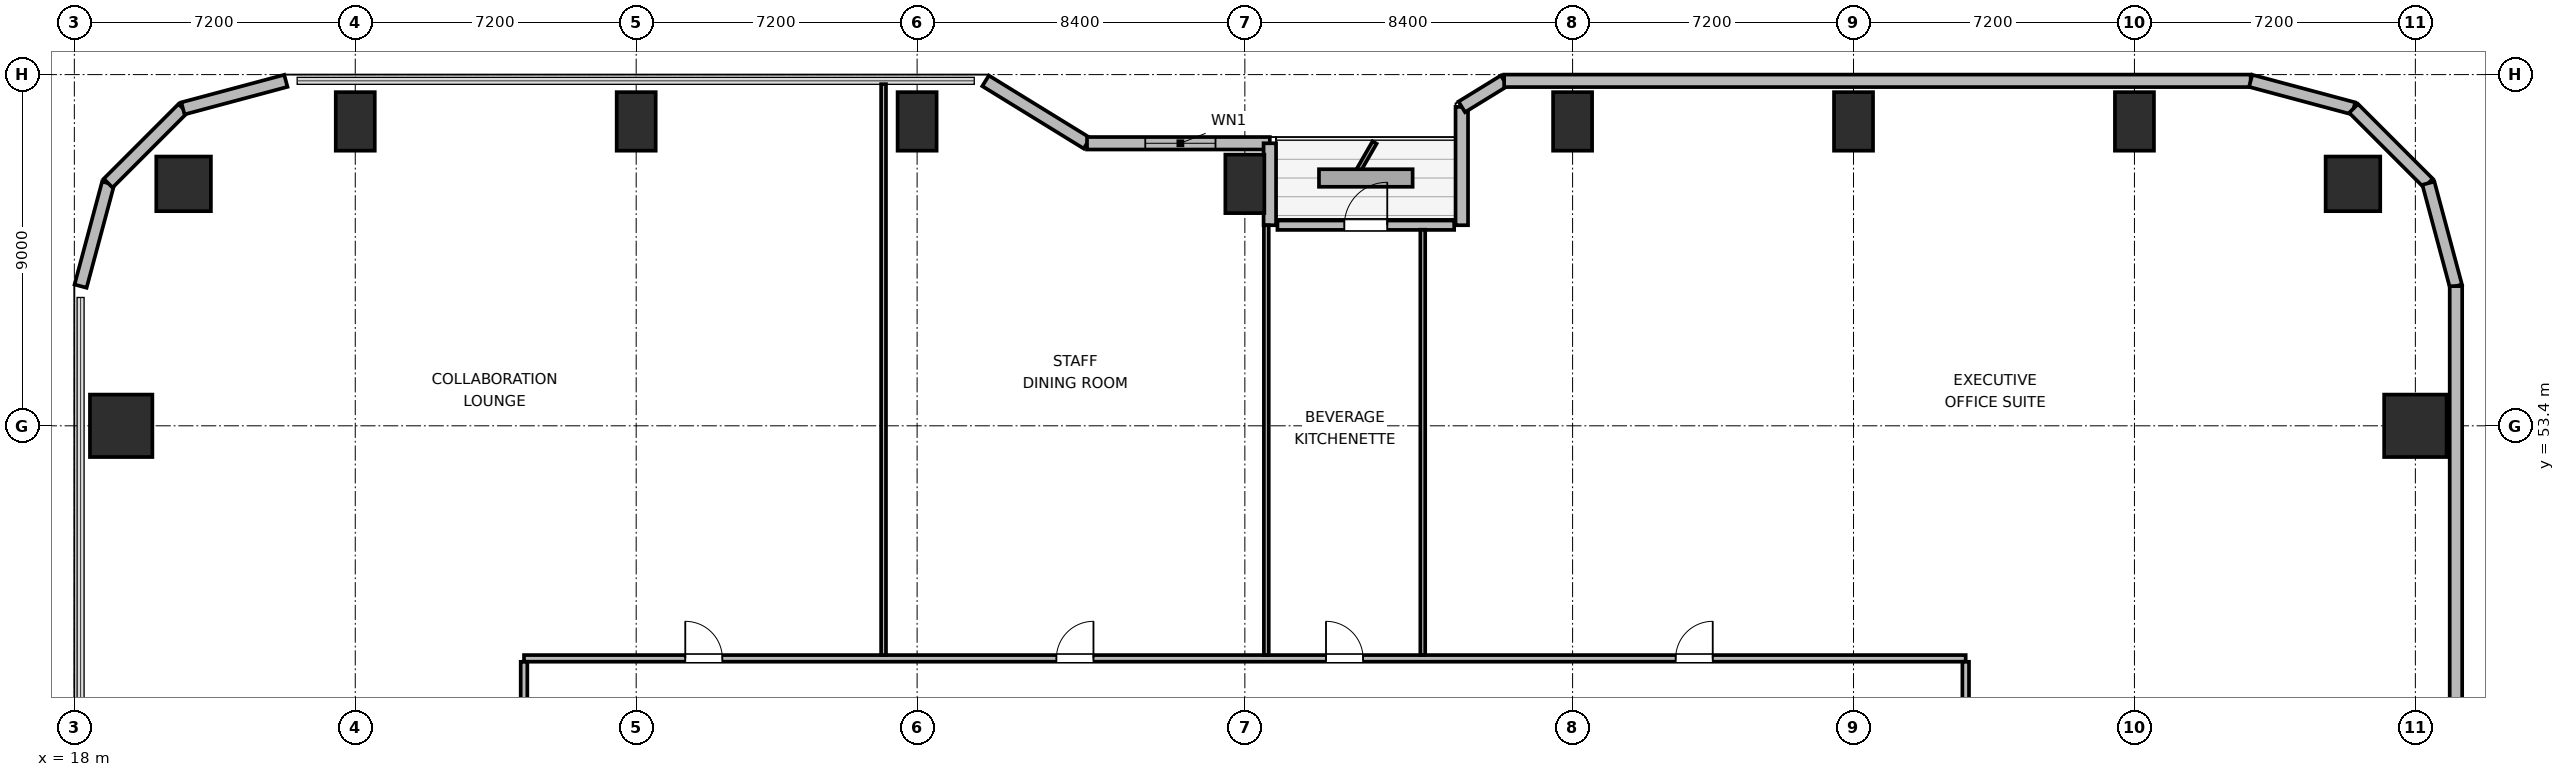
"""IFC4 building model, lengths in metres.
Left out: names, types, materials, properties, quantities, classifications, styles, units other than length and angle.
Written with IfcOpenShell. Run it as: python <this file> out.ifc"""

import sys

from ifc_helpers import new_model, si_unit, direction, frame, frame_2d, origin, origin_2d, place, context, subcontext, project, spatial, rectangle, circle, extrude, element, fill, save


model = new_model("IFC4")
c1 = context("Model", 3, precision=1e-05, world=origin(), true_north=direction((0.0, 1.0)))
c2 = subcontext(c1, "Body", "Model", "MODEL_VIEW")
j1 = project(units=[si_unit("LENGTHUNIT", "METRE"), si_unit("PLANEANGLEUNIT", "RADIAN")], contexts=[c1])
p1 = place(None, origin())
s1 = spatial("IfcSite", under=j1, at=p1, CompositionType="ELEMENT")
p2 = place(p1, origin())
s2 = spatial("IfcBuilding", under=s1, at=p2, CompositionType="ELEMENT")
p3 = place(p2, frame((0.0, 0.0, 60.6)))
s3 = spatial("IfcBuildingStorey", under=s2, at=p3, CompositionType="ELEMENT", Elevation=60.6)
for number, where, z_axis, x_axis in (
    (1, (76.4, 59.6, 0.0), (0.0, 0.0, 1.0), (1.0, 0.0, 0.0)),
    (2, (20.8, 59.6, 0.0), (0.0, 0.0, 1.0), (1.0, 0.0, 0.0)),
):
    element("IfcColumn", number, at=place(p3, frame(where, z_axis=z_axis, x_axis=x_axis)), inside=s3, PredefinedType="COLUMN", context=c2, shape_type="SweptSolid", body=[
        extrude(circle(Radius=0.7, at=origin_2d()), origin(), (0.0, 0.0, 1.0), 3.9),
    ])
for number, where, z_axis, x_axis in (
    (3, (25.2, 61.2, 0.0), (0.0, 0.0, 1.0), (1.0, 0.0, 0.0)),
    (4, (32.4, 61.2, 0.0), (0.0, 0.0, 1.0), (1.0, 0.0, 0.0)),
    (5, (39.6, 61.2, 0.0), (0.0, 0.0, 1.0), (1.0, 0.0, 0.0)),
    (6, (48.0, 59.6, 0.0), (0.0, 0.0, 1.0), (1.0, 0.0, 0.0)),
    (7, (56.4, 61.2, 0.0), (0.0, 0.0, 1.0), (1.0, 0.0, 0.0)),
    (8, (63.6, 61.2, 0.0), (0.0, 0.0, 1.0), (1.0, 0.0, 0.0)),
    (9, (70.8, 61.2, 0.0), (0.0, 0.0, 1.0), (1.0, 0.0, 0.0)),
):
    element("IfcColumn", number, at=place(p3, frame(where, z_axis=z_axis, x_axis=x_axis)), inside=s3, PredefinedType="COLUMN", context=c2, shape_type="SweptSolid", body=[
        extrude(rectangle(XDim=1.0, YDim=1.5, at=origin_2d()), origin(), (0.0, 0.0, 1.0), 3.9),
    ])
for number, where, z_axis, x_axis in (
    (10, (19.2, 53.4, 0.0), (0.0, 0.0, 1.0), (1.0, 0.0, 0.0)),
    (11, (78.0, 53.4, 0.0), (0.0, 0.0, 1.0), (1.0, 0.0, 0.0)),
):
    element("IfcColumn", number, at=place(p3, frame(where, z_axis=z_axis, x_axis=x_axis)), inside=s3, PredefinedType="COLUMN", context=c2, shape_type="SweptSolid", body=[
        extrude(rectangle(XDim=1.6, YDim=1.6, at=origin_2d()), origin(), (0.0, 0.0, 1.0), 3.9),
    ])
p4 = place(p3, frame((18.16, 56.979, 0.0), z_axis=(0.0, 0.0, 1.0), x_axis=(0.25869736047, 0.965958423373, 0.0)))
e12 = element("IfcWall", 12, at=p4, inside=s3, PredefinedType="SOLIDWALL", context=c2, shape_type="SweptSolid", body=[
    extrude(rectangle(XDim=2.731, YDim=0.32, at=frame_2d((1.366, 0.0))), origin(), (0.0, 0.0, 1.0), 3.64),
])
p5 = place(p3, frame((18.866, 59.617, 0.0), z_axis=(0.0, 0.0, 1.0), x_axis=(0.707106781187, 0.707106781187, 0.0)))
e13 = element("IfcWall", 13, at=p5, inside=s3, PredefinedType="SOLIDWALL", context=c2, shape_type="SweptSolid", body=[
    extrude(rectangle(XDim=2.71, YDim=0.32, at=frame_2d((1.355, 0.0))), origin(), (0.0, 0.0, 1.0), 3.64),
])
p6 = place(p3, frame((20.783, 61.533, 0.0), z_axis=(0.0, 0.0, 1.0), x_axis=(0.965964405026, 0.25867502435, 0.0)))
e14 = element("IfcWall", 14, at=p6, inside=s3, PredefinedType="SOLIDWALL", context=c2, shape_type="SweptSolid", body=[
    extrude(rectangle(XDim=2.731, YDim=0.32, at=frame_2d((1.366, 0.0))), origin(), (0.0, 0.0, 1.0), 3.64),
])
p7 = place(p3, frame((41.355, 62.24, 0.0), z_axis=(0.0, 0.0, 1.0), x_axis=(0.851630857047, -0.524142044989, 0.0)))
e15 = element("IfcWall", 15, at=p7, inside=s3, PredefinedType="SOLIDWALL", context=c2, shape_type="SweptSolid", body=[
    extrude(rectangle(XDim=3.053, YDim=0.32, at=frame_2d((1.526, 0.0))), origin(), (0.0, 0.0, 1.0), 2.875),
])
p8 = place(p3, frame((43.955, 60.64, 0.0), z_axis=(0.0, 0.0, 1.0), x_axis=(1.0, 0.0, 0.0)))
e16 = element("IfcWall", 16, at=p8, inside=s3, PredefinedType="SOLIDWALL", context=c2, shape_type="SweptSolid", body=[
    extrude(rectangle(XDim=4.685, YDim=0.32, at=frame_2d((2.343, 0.0))), origin(), (0.0, 0.0, 1.0), 2.875),
])
p9 = place(p8, frame((1.493, 0.0, 0.85)))
e17 = element("IfcOpeningElement", 17, at=p9, cuts=e16, PredefinedType="OPENING", context=c2, shape_type="SweptSolid", body=[
    extrude(rectangle(XDim=1.8, YDim=1.1, at=frame_2d((0.9, 0.55))), frame((0.0, 0.17, 0.0), z_axis=(0.0, -1.0, 0.0), x_axis=(1.0, 0.0, 0.0)), (0.0, 0.0, 1.0), 0.34),
])
p10 = place(p3, frame((48.64, 60.64, 0.0), z_axis=(0.0, 0.0, 1.0), x_axis=(0.0, -1.0, 0.0)))
e18 = element("IfcWall", 18, at=p10, inside=s3, PredefinedType="SOLIDWALL", context=c2, shape_type="SweptSolid", body=[
    extrude(rectangle(XDim=2.1, YDim=0.32, at=frame_2d((1.05, 0.0))), origin(), (0.0, 0.0, 1.0), 2.875),
])
p11 = place(p3, frame((48.835, 58.54, 0.0), z_axis=(0.0, 0.0, 1.0), x_axis=(1.0, 0.0, 0.0)))
e19 = element("IfcWall", 19, at=p11, inside=s3, PredefinedType="SOLIDWALL", context=c2, shape_type="SweptSolid", body=[
    extrude(rectangle(XDim=4.53, YDim=0.24, at=frame_2d((2.265, 0.0))), origin(), (0.0, 0.0, 1.0), 3.64),
])
p12 = place(p11, frame((1.715, 0.0, 0.0)))
e20 = element("IfcOpeningElement", 20, at=p12, cuts=e19, PredefinedType="OPENING", context=c2, shape_type="SweptSolid", body=[
    extrude(rectangle(XDim=1.1, YDim=2.04, at=frame_2d((0.55, 1.02))), frame((0.0, 0.13, 0.0), z_axis=(0.0, -1.0, 0.0), x_axis=(1.0, 0.0, 0.0)), (0.0, 0.0, 1.0), 0.26),
])
p13 = place(p3, frame((53.56, 58.54, 0.0), z_axis=(0.0, 0.0, 1.0), x_axis=(0.0, 1.0, 0.0)))
e21 = element("IfcWall", 21, at=p13, inside=s3, PredefinedType="SOLIDWALL", context=c2, shape_type="SweptSolid", body=[
    extrude(rectangle(XDim=3.032, YDim=0.32, at=frame_2d((1.516, 0.0))), origin(), (0.0, 0.0, 1.0), 2.875),
])
p14 = place(p3, frame((53.56, 61.573, 0.0), z_axis=(0.0, 0.0, 1.0), x_axis=(0.851776724646, 0.523904964045, 0.0)))
e22 = element("IfcWall", 22, at=p14, inside=s3, PredefinedType="SOLIDWALL", context=c2, shape_type="SweptSolid", body=[
    extrude(rectangle(XDim=1.274, YDim=0.32, at=frame_2d((0.637, 0.0))), origin(), (0.0, 0.0, 1.0), 3.64),
])
p15 = place(p3, frame((54.645, 62.24, 0.0), z_axis=(0.0, 0.0, 1.0), x_axis=(1.0, 0.0, 0.0)))
e23 = element("IfcWall", 23, at=p15, inside=s3, PredefinedType="SOLIDWALL", context=c2, shape_type="SweptSolid", body=[
    extrude(rectangle(XDim=19.134, YDim=0.32, at=frame_2d((9.567, 0.0))), origin(), (0.0, 0.0, 1.0), 3.64),
])
p16 = place(p3, frame((73.779, 62.24, 0.0), z_axis=(0.0, 0.0, 1.0), x_axis=(0.965964405026, -0.25867502435, 0.0)))
e24 = element("IfcWall", 24, at=p16, inside=s3, PredefinedType="SOLIDWALL", context=c2, shape_type="SweptSolid", body=[
    extrude(rectangle(XDim=2.731, YDim=0.32, at=frame_2d((1.366, 0.0))), origin(), (0.0, 0.0, 1.0), 3.64),
])
p17 = place(p3, frame((76.417, 61.533, 0.0), z_axis=(0.0, 0.0, 1.0), x_axis=(0.707106781187, -0.707106781187, 0.0)))
e25 = element("IfcWall", 25, at=p17, inside=s3, PredefinedType="SOLIDWALL", context=c2, shape_type="SweptSolid", body=[
    extrude(rectangle(XDim=2.71, YDim=0.32, at=frame_2d((1.355, 0.0))), origin(), (0.0, 0.0, 1.0), 3.64),
])
p18 = place(p3, frame((78.333, 59.617, 0.0), z_axis=(0.0, 0.0, 1.0), x_axis=(0.25869736047, -0.965958423373, 0.0)))
e26 = element("IfcWall", 26, at=p18, inside=s3, PredefinedType="SOLIDWALL", context=c2, shape_type="SweptSolid", body=[
    extrude(rectangle(XDim=2.731, YDim=0.32, at=frame_2d((1.366, 0.0))), origin(), (0.0, 0.0, 1.0), 3.64),
])
p19 = place(p3, frame((79.04, 56.979, 0.0), z_axis=(0.0, 0.0, 1.0), x_axis=(0.0, -1.0, 0.0)))
e27 = element("IfcWall", 27, at=p19, inside=s3, PredefinedType="SOLIDWALL", context=c2, shape_type="SweptSolid", body=[
    extrude(rectangle(XDim=14.219, YDim=0.32, at=frame_2d((7.109, 0.0))), origin(), (0.0, 0.0, 1.0), 3.64),
])
p20 = place(p3, frame((29.525, 47.44, 0.0), z_axis=(0.0, 0.0, 1.0), x_axis=(1.0, 0.0, 0.0)))
e28 = element("IfcWall", 28, at=p20, inside=s3, PredefinedType="PARTITIONING", context=c2, shape_type="SweptSolid", body=[
    extrude(rectangle(XDim=36.95, YDim=0.17, at=frame_2d((18.475, 0.0))), origin(), (0.0, 0.0, 1.0), 3.64),
])
p21 = place(p20, frame((4.133, 0.0, 0.0)))
e29 = element("IfcOpeningElement", 29, at=p21, cuts=e28, PredefinedType="OPENING", context=c2, shape_type="SweptSolid", body=[
    extrude(rectangle(XDim=0.95, YDim=2.04, at=frame_2d((0.475, 1.02))), frame((0.0, 0.095, 0.0), z_axis=(0.0, -1.0, 0.0), x_axis=(1.0, 0.0, 0.0)), (0.0, 0.0, 1.0), 0.19),
])
p22 = place(p20, frame((13.645, 0.0, 0.0)))
e30 = element("IfcOpeningElement", 30, at=p22, cuts=e28, PredefinedType="OPENING", context=c2, shape_type="SweptSolid", body=[
    extrude(rectangle(XDim=0.95, YDim=2.04, at=frame_2d((0.475, 1.02))), frame((0.0, 0.095, 0.0), z_axis=(0.0, -1.0, 0.0), x_axis=(1.0, 0.0, 0.0)), (0.0, 0.0, 1.0), 0.19),
])
p23 = place(p20, frame((20.555, 0.0, 0.0)))
e31 = element("IfcOpeningElement", 31, at=p23, cuts=e28, PredefinedType="OPENING", context=c2, shape_type="SweptSolid", body=[
    extrude(rectangle(XDim=0.95, YDim=2.04, at=frame_2d((0.475, 1.02))), frame((0.0, 0.095, 0.0), z_axis=(0.0, -1.0, 0.0), x_axis=(1.0, 0.0, 0.0)), (0.0, 0.0, 1.0), 0.19),
])
p24 = place(p20, frame((29.517, 0.0, 0.0)))
e32 = element("IfcOpeningElement", 32, at=p24, cuts=e28, PredefinedType="OPENING", context=c2, shape_type="SweptSolid", body=[
    extrude(rectangle(XDim=0.95, YDim=2.04, at=frame_2d((0.475, 1.02))), frame((0.0, 0.095, 0.0), z_axis=(0.0, -1.0, 0.0), x_axis=(1.0, 0.0, 0.0)), (0.0, 0.0, 1.0), 0.19),
])
p25 = place(p3, frame((29.525, 24.647, 0.0), z_axis=(0.0, 0.0, 1.0), x_axis=(0.0, 1.0, 0.0)))
e33 = element("IfcWall", 33, at=p25, inside=s3, PredefinedType="PARTITIONING", context=c2, shape_type="SweptSolid", body=[
    extrude(rectangle(XDim=22.706, YDim=0.17, at=frame_2d((11.353, 0.0))), origin(), (0.0, 0.0, 1.0), 3.64),
])
p26 = place(p25, frame((4.758, 0.0, 0.0)))
e34 = element("IfcOpeningElement", 34, at=p26, cuts=e33, PredefinedType="OPENING", context=c2, shape_type="SweptSolid", body=[
    extrude(rectangle(XDim=0.95, YDim=2.04, at=frame_2d((0.475, 1.02))), frame((0.0, 0.095, 0.0), z_axis=(0.0, -1.0, 0.0), x_axis=(1.0, 0.0, 0.0)), (0.0, 0.0, 1.0), 0.19),
])
p27 = place(p25, frame((16.198, 0.0, 0.0)))
e35 = element("IfcOpeningElement", 35, at=p27, cuts=e33, PredefinedType="OPENING", context=c2, shape_type="SweptSolid", body=[
    extrude(rectangle(XDim=0.95, YDim=2.04, at=frame_2d((0.475, 1.02))), frame((0.0, 0.095, 0.0), z_axis=(0.0, -1.0, 0.0), x_axis=(1.0, 0.0, 0.0)), (0.0, 0.0, 1.0), 0.19),
])
p28 = place(p3, frame((66.475, 24.647, 0.0), z_axis=(0.0, 0.0, 1.0), x_axis=(0.0, 1.0, 0.0)))
e36 = element("IfcWall", 36, at=p28, inside=s3, PredefinedType="PARTITIONING", context=c2, shape_type="SweptSolid", body=[
    extrude(rectangle(XDim=22.706, YDim=0.17, at=frame_2d((11.353, 0.0))), origin(), (0.0, 0.0, 1.0), 3.64),
])
p29 = place(p28, frame((5.758, 0.0, 0.0)))
e37 = element("IfcOpeningElement", 37, at=p29, cuts=e36, PredefinedType="OPENING", context=c2, shape_type="SweptSolid", body=[
    extrude(rectangle(XDim=0.95, YDim=2.04, at=frame_2d((0.475, 1.02))), frame((0.0, 0.095, 0.0), z_axis=(0.0, -1.0, 0.0), x_axis=(1.0, 0.0, 0.0)), (0.0, 0.0, 1.0), 0.19),
])
p30 = place(p28, frame((17.198, 0.0, 0.0)))
e38 = element("IfcOpeningElement", 38, at=p30, cuts=e36, PredefinedType="OPENING", context=c2, shape_type="SweptSolid", body=[
    extrude(rectangle(XDim=0.95, YDim=2.04, at=frame_2d((0.475, 1.02))), frame((0.0, 0.095, 0.0), z_axis=(0.0, -1.0, 0.0), x_axis=(1.0, 0.0, 0.0)), (0.0, 0.0, 1.0), 0.19),
])
p31 = place(p3, frame((38.74, 47.527, 0.0), z_axis=(0.0, 0.0, 1.0), x_axis=(0.0, 1.0, 0.0)))
e39 = element("IfcWall", 39, at=p31, inside=s3, PredefinedType="PARTITIONING", context=c2, shape_type="SweptSolid", body=[
    extrude(rectangle(XDim=14.628, YDim=0.125, at=frame_2d((7.314, 0.0))), origin(), (0.0, 0.0, 1.0), 3.64),
])
p32 = place(p3, frame((48.55, 47.527, 0.0), z_axis=(0.0, 0.0, 1.0), x_axis=(0.0, 1.0, 0.0)))
e40 = element("IfcWall", 40, at=p32, inside=s3, PredefinedType="PARTITIONING", context=c2, shape_type="SweptSolid", body=[
    extrude(rectangle(XDim=11.013, YDim=0.125, at=frame_2d((5.506, 0.0))), origin(), (0.0, 0.0, 1.0), 3.64),
])
p33 = place(p3, frame((52.56, 47.527, 0.0), z_axis=(0.0, 0.0, 1.0), x_axis=(0.0, 1.0, 0.0)))
e41 = element("IfcWall", 41, at=p33, inside=s3, PredefinedType="PARTITIONING", context=c2, shape_type="SweptSolid", body=[
    extrude(rectangle(XDim=10.898, YDim=0.125, at=frame_2d((5.449, 0.0))), origin(), (0.0, 0.0, 1.0), 3.003),
])
p34 = place(p9, origin())
e42 = element("IfcWindow", 42, at=p34, inside=s3, PartitioningType="SINGLE_PANEL", PredefinedType="WINDOW", context=c2, shape_type="SweptSolid", body=[
    extrude(rectangle(XDim=1.8, YDim=1.1, at=frame_2d((0.9, 0.55))), frame((0.0, 0.03, 0.0), z_axis=(0.0, -1.0, 0.0), x_axis=(1.0, 0.0, 0.0)), (0.0, 0.0, 1.0), 0.06),
])
fill(e17, e42)
p35 = place(p12, origin())
e43 = element("IfcDoor", 43, at=p35, inside=s3, OperationType="SINGLE_SWING_RIGHT", PredefinedType="DOOR", context=c2, shape_type="SweptSolid", body=[
    extrude(rectangle(XDim=1.1, YDim=2.04, at=frame_2d((0.55, 1.02))), frame((0.0, 0.025, 0.0), z_axis=(0.0, -1.0, 0.0), x_axis=(1.0, 0.0, 0.0)), (0.0, 0.0, 1.0), 0.05),
])
fill(e20, e43)
p36 = place(p21, origin())
e44 = element("IfcDoor", 44, at=p36, inside=s3, OperationType="SINGLE_SWING_LEFT", PredefinedType="DOOR", context=c2, shape_type="SweptSolid", body=[
    extrude(rectangle(XDim=0.95, YDim=2.04, at=frame_2d((0.475, 1.02))), frame((0.0, 0.025, 0.0), z_axis=(0.0, -1.0, 0.0), x_axis=(1.0, 0.0, 0.0)), (0.0, 0.0, 1.0), 0.05),
])
fill(e29, e44)
p37 = place(p22, origin())
e45 = element("IfcDoor", 45, at=p37, inside=s3, OperationType="SINGLE_SWING_RIGHT", PredefinedType="DOOR", context=c2, shape_type="SweptSolid", body=[
    extrude(rectangle(XDim=0.95, YDim=2.04, at=frame_2d((0.475, 1.02))), frame((0.0, 0.025, 0.0), z_axis=(0.0, -1.0, 0.0), x_axis=(1.0, 0.0, 0.0)), (0.0, 0.0, 1.0), 0.05),
])
fill(e30, e45)
p38 = place(p23, origin())
e46 = element("IfcDoor", 46, at=p38, inside=s3, OperationType="SINGLE_SWING_LEFT", PredefinedType="DOOR", context=c2, shape_type="SweptSolid", body=[
    extrude(rectangle(XDim=0.95, YDim=2.04, at=frame_2d((0.475, 1.02))), frame((0.0, 0.025, 0.0), z_axis=(0.0, -1.0, 0.0), x_axis=(1.0, 0.0, 0.0)), (0.0, 0.0, 1.0), 0.05),
])
fill(e31, e46)
p39 = place(p24, origin())
e47 = element("IfcDoor", 47, at=p39, inside=s3, OperationType="SINGLE_SWING_RIGHT", PredefinedType="DOOR", context=c2, shape_type="SweptSolid", body=[
    extrude(rectangle(XDim=0.95, YDim=2.04, at=frame_2d((0.475, 1.02))), frame((0.0, 0.025, 0.0), z_axis=(0.0, -1.0, 0.0), x_axis=(1.0, 0.0, 0.0)), (0.0, 0.0, 1.0), 0.05),
])
fill(e32, e47)
save(model, sys.argv[1])
